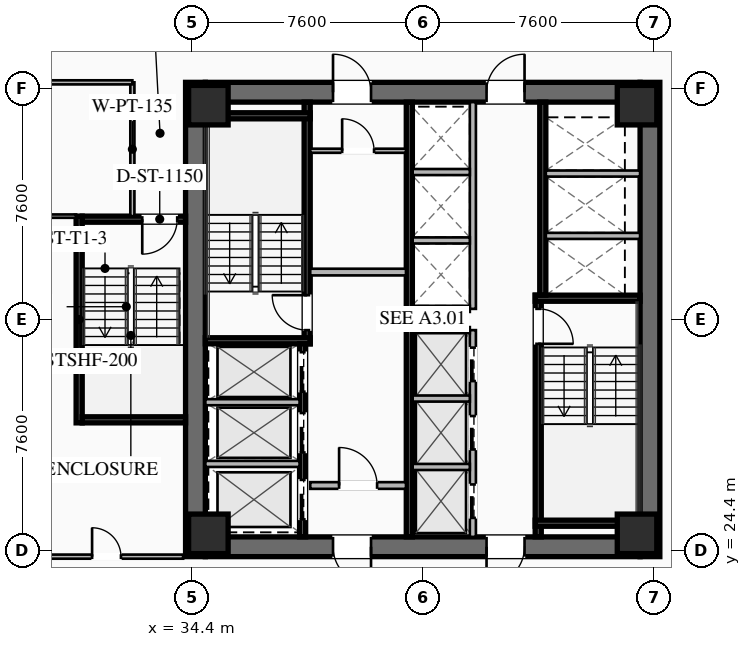
"""IFC4 building model, lengths in metres.
Left out: names, types, materials, properties, quantities, classifications, styles, units other than length and angle.
Written with IfcOpenShell. Run it as: python <this file> out.ifc"""

import sys

from ifc_helpers import new_model, si_unit, direction, frame, frame_2d, origin, origin_2d, place, context, subcontext, project, spatial, rectangle, hollow_rectangle, extrude, element, fill, save


model = new_model("IFC4")
c1 = context("Model", 3, precision=1e-05, world=origin(), true_north=direction((0.0, 1.0)))
c2 = subcontext(c1, "Body", "Model", "MODEL_VIEW")
j1 = project(units=[si_unit("LENGTHUNIT", "METRE"), si_unit("PLANEANGLEUNIT", "RADIAN")], contexts=[c1])
p1 = place(None, origin())
s1 = spatial("IfcSite", under=j1, at=p1, CompositionType="ELEMENT")
p2 = place(p1, origin())
s2 = spatial("IfcBuilding", under=s1, at=p2, CompositionType="ELEMENT")
p3 = place(p2, frame((0.0, 0.0, 49.45)))
s3 = spatial("IfcBuildingStorey", under=s2, at=p3, CompositionType="ELEMENT", Elevation=49.45)
for number, where, z_axis, x_axis in (
    (1, (34.525, 24.2, 0.0), (0.0, 0.0, 1.0), (0.0, 1.0, 0.0)),
    (2, (49.475, 39.8, 0.0), (0.0, 0.0, 1.0), (0.0, -1.0, 0.0)),
):
    element("IfcWall", number, at=place(p3, frame(where, z_axis=z_axis, x_axis=x_axis)), inside=s3, PredefinedType="SHEAR", context=c2, shape_type="SweptSolid", body=[
        extrude(rectangle(XDim=15.6, YDim=0.65, at=frame_2d((7.8, 0.0))), origin(), (0.0, 0.0, 1.0), 3.55),
    ])
p4 = place(p3, frame((49.15, 24.525, 0.0), z_axis=(0.0, 0.0, 1.0), x_axis=(-1.0, 0.0, 0.0)))
e3 = element("IfcWall", 3, at=p4, inside=s3, PredefinedType="SHEAR", context=c2, shape_type="SweptSolid", body=[
    extrude(rectangle(XDim=14.3, YDim=0.65, at=frame_2d((7.15, 0.0))), origin(), (0.0, 0.0, 1.0), 3.55),
])
p5 = place(p4, frame((8.85, 0.0, 0.0)))
e4 = element("IfcOpeningElement", 4, at=p5, cuts=e3, PredefinedType="OPENING", context=c2, shape_type="SweptSolid", body=[
    extrude(rectangle(XDim=1.25, YDim=2.25, at=frame_2d((0.625, 1.125))), frame((0.0, 0.335, 0.0), z_axis=(0.0, -1.0, 0.0), x_axis=(1.0, 0.0, 0.0)), (0.0, 0.0, 1.0), 0.67),
])
p6 = place(p4, frame((3.8, 0.0, 0.0)))
e5 = element("IfcOpeningElement", 5, at=p6, cuts=e3, PredefinedType="OPENING", context=c2, shape_type="SweptSolid", body=[
    extrude(rectangle(XDim=1.25, YDim=2.25, at=frame_2d((0.625, 1.125))), frame((0.0, 0.335, 0.0), z_axis=(0.0, -1.0, 0.0), x_axis=(1.0, 0.0, 0.0)), (0.0, 0.0, 1.0), 0.67),
])
p7 = place(p3, frame((34.85, 39.475, 0.0), z_axis=(0.0, 0.0, 1.0), x_axis=(1.0, 0.0, 0.0)))
e6 = element("IfcWall", 6, at=p7, inside=s3, PredefinedType="SHEAR", context=c2, shape_type="SweptSolid", body=[
    extrude(rectangle(XDim=14.3, YDim=0.65, at=frame_2d((7.15, 0.0))), origin(), (0.0, 0.0, 1.0), 3.55),
])
p8 = place(p7, frame((4.2, 0.0, 0.0)))
e7 = element("IfcOpeningElement", 7, at=p8, cuts=e6, PredefinedType="OPENING", context=c2, shape_type="SweptSolid", body=[
    extrude(rectangle(XDim=1.25, YDim=2.25, at=frame_2d((0.625, 1.125))), frame((0.0, 0.335, 0.0), z_axis=(0.0, -1.0, 0.0), x_axis=(1.0, 0.0, 0.0)), (0.0, 0.0, 1.0), 0.67),
])
p9 = place(p7, frame((9.25, 0.0, 0.0)))
e8 = element("IfcOpeningElement", 8, at=p9, cuts=e6, PredefinedType="OPENING", context=c2, shape_type="SweptSolid", body=[
    extrude(rectangle(XDim=1.25, YDim=2.25, at=frame_2d((0.625, 1.125))), frame((0.0, 0.335, 0.0), z_axis=(0.0, -1.0, 0.0), x_axis=(1.0, 0.0, 0.0)), (0.0, 0.0, 1.0), 0.67),
])
for number, where, z_axis, x_axis in (
    (9, (34.95, 24.95, 0.0), (0.0, 0.0, 1.0), (1.0, 0.0, 0.0)),
    (10, (49.05, 24.95, 0.0), (0.0, 0.0, 1.0), (1.0, 0.0, 0.0)),
    (11, (49.05, 39.05, 0.0), (0.0, 0.0, 1.0), (1.0, 0.0, 0.0)),
    (12, (34.95, 39.05, 0.0), (0.0, 0.0, 1.0), (1.0, 0.0, 0.0)),
):
    element("IfcColumn", number, at=place(p3, frame(where, z_axis=z_axis, x_axis=x_axis)), inside=s3, PredefinedType="COLUMN", context=c2, shape_type="SweptSolid", body=[
        extrude(hollow_rectangle(XDim=1.3, YDim=1.3, WallThickness=0.05, at=origin_2d()), origin(), (0.0, 0.0, 1.0), 3.35),
    ])
p10 = place(p3, frame((38.2, 31.2, 0.0), z_axis=(0.0, 0.0, 1.0), x_axis=(0.0, 1.0, 0.0)))
e13 = element("IfcWall", 13, at=p10, inside=s3, PredefinedType="SHEAR", context=c2, shape_type="SweptSolid", body=[
    extrude(rectangle(XDim=7.95, YDim=0.2, at=frame_2d((3.975, 0.0))), origin(), (0.0, 0.0, 1.0), 3.35),
])
p11 = place(p10, frame((0.45, 0.0, 0.0)))
e14 = element("IfcOpeningElement", 14, at=p11, cuts=e13, PredefinedType="OPENING", context=c2, shape_type="SweptSolid", body=[
    extrude(rectangle(XDim=1.15, YDim=2.2, at=frame_2d((0.575, 1.1))), frame((0.0, 0.11, 0.0), z_axis=(0.0, -1.0, 0.0), x_axis=(1.0, 0.0, 0.0)), (0.0, 0.0, 1.0), 0.22),
])
for number, where, z_axis, x_axis in (
    (15, (34.85, 31.3, 0.0), (0.0, 0.0, 1.0), (1.0, 0.0, 0.0)),
    (16, (34.85, 38.7, 0.0), (0.0, 0.0, 1.0), (1.0, 0.0, 0.0)),
):
    element("IfcWall", number, at=place(p3, frame(where, z_axis=z_axis, x_axis=x_axis)), inside=s3, PredefinedType="SHEAR", context=c2, shape_type="SweptSolid", body=[
        extrude(rectangle(XDim=3.45, YDim=0.2, at=frame_2d((1.725, 0.0))), origin(), (0.0, 0.0, 1.0), 3.35),
    ])
p12 = place(p3, frame((45.8, 32.8, 0.0), z_axis=(0.0, 0.0, 1.0), x_axis=(0.0, -1.0, 0.0)))
e17 = element("IfcWall", 17, at=p12, inside=s3, PredefinedType="SHEAR", context=c2, shape_type="SweptSolid", body=[
    extrude(rectangle(XDim=7.95, YDim=0.2, at=frame_2d((3.975, 0.0))), origin(), (0.0, 0.0, 1.0), 3.35),
])
p13 = place(p12, frame((0.45, 0.0, 0.0)))
e18 = element("IfcOpeningElement", 18, at=p13, cuts=e17, PredefinedType="OPENING", context=c2, shape_type="SweptSolid", body=[
    extrude(rectangle(XDim=1.15, YDim=2.2, at=frame_2d((0.575, 1.1))), frame((0.0, 0.11, 0.0), z_axis=(0.0, -1.0, 0.0), x_axis=(1.0, 0.0, 0.0)), (0.0, 0.0, 1.0), 0.22),
])
for number, where, z_axis, x_axis in (
    (19, (45.7, 32.7, 0.0), (0.0, 0.0, 1.0), (1.0, 0.0, 0.0)),
    (20, (45.7, 25.3, 0.0), (0.0, 0.0, 1.0), (1.0, 0.0, 0.0)),
):
    element("IfcWall", number, at=place(p3, frame(where, z_axis=z_axis, x_axis=x_axis)), inside=s3, PredefinedType="SHEAR", context=c2, shape_type="SweptSolid", body=[
        extrude(rectangle(XDim=3.45, YDim=0.2, at=frame_2d((1.725, 0.0))), origin(), (0.0, 0.0, 1.0), 3.35),
    ])
p14 = place(p3, frame((41.56, 24.85, 0.0), z_axis=(0.0, 0.0, 1.0), x_axis=(0.0, 1.0, 0.0)))
e21 = element("IfcWall", 21, at=p14, inside=s3, PredefinedType="SHEAR", context=c2, shape_type="SweptSolid", body=[
    extrude(rectangle(XDim=14.3, YDim=0.2, at=frame_2d((7.15, 0.0))), origin(), (0.0, 0.0, 1.0), 3.35),
])
p15 = place(p3, frame((38.3, 33.56, 0.0), z_axis=(0.0, 0.0, 1.0), x_axis=(1.0, 0.0, 0.0)))
e22 = element("IfcWall", 22, at=p15, inside=s3, PredefinedType="SOLIDWALL", context=c2, shape_type="SweptSolid", body=[
    extrude(rectangle(XDim=3.15, YDim=0.22, at=frame_2d((1.575, 0.0))), origin(), (0.0, 0.0, 1.0), 2.703),
])
p16 = place(p3, frame((38.3, 26.54, 0.0), z_axis=(0.0, 0.0, 1.0), x_axis=(1.0, 0.0, 0.0)))
e23 = element("IfcWall", 23, at=p16, inside=s3, PredefinedType="SOLIDWALL", context=c2, shape_type="SweptSolid", body=[
    extrude(rectangle(XDim=3.15, YDim=0.22, at=frame_2d((1.575, 0.0))), origin(), (0.0, 0.0, 1.0), 2.703),
])
p17 = place(p16, frame((0.95, 0.0, 0.0)))
e24 = element("IfcOpeningElement", 24, at=p17, cuts=e23, PredefinedType="OPENING", context=c2, shape_type="SweptSolid", body=[
    extrude(rectangle(XDim=1.25, YDim=2.25, at=frame_2d((0.625, 1.125))), frame((0.0, 0.12, 0.0), z_axis=(0.0, -1.0, 0.0), x_axis=(1.0, 0.0, 0.0)), (0.0, 0.0, 1.0), 0.24),
])
p18 = place(p3, frame((38.05, 24.85, 0.0), z_axis=(0.0, 0.0, 1.0), x_axis=(0.0, 1.0, 0.0)))
e25 = element("IfcWall", 25, at=p18, inside=s3, PredefinedType="SHEAR", context=c2, shape_type="SweptSolid", body=[
    extrude(rectangle(XDim=6.35, YDim=0.2, at=frame_2d((3.175, 0.0))), origin(), (0.0, 0.0, 1.0), 3.35),
])
p19 = place(p18, frame((4.775, 0.0, 0.0)))
e26 = element("IfcOpeningElement", 26, at=p19, cuts=e25, PredefinedType="OPENING", context=c2, shape_type="SweptSolid", body=[
    extrude(rectangle(XDim=1.3, YDim=2.25, at=frame_2d((0.65, 1.125))), frame((0.0, 0.11, 0.0), z_axis=(0.0, -1.0, 0.0), x_axis=(1.0, 0.0, 0.0)), (0.0, 0.0, 1.0), 0.22),
])
p20 = place(p18, frame((2.775, 0.0, 0.0)))
e27 = element("IfcOpeningElement", 27, at=p20, cuts=e25, PredefinedType="OPENING", context=c2, shape_type="SweptSolid", body=[
    extrude(rectangle(XDim=1.3, YDim=2.25, at=frame_2d((0.65, 1.125))), frame((0.0, 0.11, 0.0), z_axis=(0.0, -1.0, 0.0), x_axis=(1.0, 0.0, 0.0)), (0.0, 0.0, 1.0), 0.22),
])
p21 = place(p18, frame((0.575, 0.0, 0.0)))
e28 = element("IfcOpeningElement", 28, at=p21, cuts=e25, PredefinedType="OPENING", context=c2, shape_type="SweptSolid", body=[
    extrude(rectangle(XDim=1.3, YDim=2.25, at=frame_2d((0.65, 1.125))), frame((0.0, 0.11, 0.0), z_axis=(0.0, -1.0, 0.0), x_axis=(1.0, 0.0, 0.0)), (0.0, 0.0, 1.0), 0.22),
])
for number, where, z_axis, x_axis in (
    (29, (34.85, 27.25, 0.0), (0.0, 0.0, 1.0), (1.0, 0.0, 0.0)),
    (30, (34.85, 29.28, 0.0), (0.0, 0.0, 1.0), (1.0, 0.0, 0.0)),
):
    element("IfcWall", number, at=place(p3, frame(where, z_axis=z_axis, x_axis=x_axis)), inside=s3, PredefinedType="SOLIDWALL", context=c2, shape_type="SweptSolid", body=[
        extrude(rectangle(XDim=3.1, YDim=0.2, at=frame_2d((1.55, 0.0))), origin(), (0.0, 0.0, 1.0), 3.35),
    ])
p22 = place(p3, frame((45.95, 39.15, 0.0), z_axis=(0.0, 0.0, 1.0), x_axis=(0.0, -1.0, 0.0)))
e31 = element("IfcWall", 31, at=p22, inside=s3, PredefinedType="SHEAR", context=c2, shape_type="SweptSolid", body=[
    extrude(rectangle(XDim=6.35, YDim=0.2, at=frame_2d((3.175, 0.0))), origin(), (0.0, 0.0, 1.0), 3.35),
])
for number, where, z_axis, x_axis in (
    (32, (46.05, 34.75, 0.0), (0.0, 0.0, 1.0), (1.0, 0.0, 0.0)),
    (33, (46.05, 36.8, 0.0), (0.0, 0.0, 1.0), (1.0, 0.0, 0.0)),
):
    element("IfcWall", number, at=place(p3, frame(where, z_axis=z_axis, x_axis=x_axis)), inside=s3, PredefinedType="SOLIDWALL", context=c2, shape_type="SweptSolid", body=[
        extrude(rectangle(XDim=3.1, YDim=0.2, at=frame_2d((1.55, 0.0))), origin(), (0.0, 0.0, 1.0), 3.35),
    ])
p23 = place(p3, frame((38.3, 37.55, 0.0), z_axis=(0.0, 0.0, 1.0), x_axis=(1.0, 0.0, 0.0)))
e34 = element("IfcWall", 34, at=p23, inside=s3, PredefinedType="PARTITIONING", context=c2, shape_type="SweptSolid", body=[
    extrude(rectangle(XDim=3.15, YDim=0.135, at=frame_2d((1.575, 0.0))), origin(), (0.0, 0.0, 1.0), 2.703),
])
p24 = place(p23, frame((1.05, 0.0, 0.0)))
e35 = element("IfcOpeningElement", 35, at=p24, cuts=e34, PredefinedType="OPENING", context=c2, shape_type="SweptSolid", body=[
    extrude(rectangle(XDim=1.05, YDim=2.2, at=frame_2d((0.525, 1.1))), frame((0.0, 0.077, 0.0), z_axis=(0.0, -1.0, 0.0), x_axis=(1.0, 0.0, 0.0)), (0.0, 0.0, 1.0), 0.155),
])
p25 = place(p3, frame((43.65, 24.85, 0.0), z_axis=(0.0, 0.0, 1.0), x_axis=(0.0, 1.0, 0.0)))
e36 = element("IfcWall", 36, at=p25, inside=s3, PredefinedType="SOLIDWALL", context=c2, shape_type="SweptSolid", body=[
    extrude(rectangle(XDim=6.8, YDim=0.2, at=frame_2d((3.4, 0.0))), origin(), (0.0, 0.0, 1.0), 3.35),
])
p26 = place(p25, frame((0.625, 0.0, 0.0)))
e37 = element("IfcOpeningElement", 37, at=p26, cuts=e36, PredefinedType="OPENING", context=c2, shape_type="SweptSolid", body=[
    extrude(rectangle(XDim=1.1, YDim=2.2, at=frame_2d((0.55, 1.1))), frame((0.0, 0.11, 0.0), z_axis=(0.0, -1.0, 0.0), x_axis=(1.0, 0.0, 0.0)), (0.0, 0.0, 1.0), 0.22),
])
p27 = place(p25, frame((2.875, 0.0, 0.0)))
e38 = element("IfcOpeningElement", 38, at=p27, cuts=e36, PredefinedType="OPENING", context=c2, shape_type="SweptSolid", body=[
    extrude(rectangle(XDim=1.1, YDim=2.2, at=frame_2d((0.55, 1.1))), frame((0.0, 0.11, 0.0), z_axis=(0.0, -1.0, 0.0), x_axis=(1.0, 0.0, 0.0)), (0.0, 0.0, 1.0), 0.22),
])
p28 = place(p25, frame((5.125, 0.0, 0.0)))
e39 = element("IfcOpeningElement", 39, at=p28, cuts=e36, PredefinedType="OPENING", context=c2, shape_type="SweptSolid", body=[
    extrude(rectangle(XDim=1.1, YDim=2.2, at=frame_2d((0.55, 1.1))), frame((0.0, 0.11, 0.0), z_axis=(0.0, -1.0, 0.0), x_axis=(1.0, 0.0, 0.0)), (0.0, 0.0, 1.0), 0.22),
])
for number, where, z_axis, x_axis in (
    (40, (41.67, 27.15, 0.0), (0.0, 0.0, 1.0), (1.0, 0.0, 0.0)),
    (41, (41.67, 29.4, 0.0), (0.0, 0.0, 1.0), (1.0, 0.0, 0.0)),
    (42, (41.67, 31.65, 0.0), (0.0, 0.0, 1.0), (1.0, 0.0, 0.0)),
):
    element("IfcWall", number, at=place(p3, frame(where, z_axis=z_axis, x_axis=x_axis)), inside=s3, PredefinedType="SOLIDWALL", context=c2, shape_type="SweptSolid", body=[
        extrude(rectangle(XDim=1.88, YDim=0.2, at=frame_2d((0.94, 0.0))), origin(), (0.0, 0.0, 1.0), 3.35),
    ])
p29 = place(p3, frame((43.65, 32.35, 0.0), z_axis=(0.0, 0.0, 1.0), x_axis=(0.0, 1.0, 0.0)))
e43 = element("IfcWall", 43, at=p29, inside=s3, PredefinedType="SOLIDWALL", context=c2, shape_type="SweptSolid", body=[
    extrude(rectangle(XDim=6.8, YDim=0.2, at=frame_2d((3.4, 0.0))), origin(), (0.0, 0.0, 1.0), 3.35),
])
for number, where, z_axis, x_axis in (
    (44, (41.67, 32.35, 0.0), (0.0, 0.0, 1.0), (1.0, 0.0, 0.0)),
    (45, (41.67, 34.6, 0.0), (0.0, 0.0, 1.0), (1.0, 0.0, 0.0)),
    (46, (41.67, 36.85, 0.0), (0.0, 0.0, 1.0), (1.0, 0.0, 0.0)),
):
    element("IfcWall", number, at=place(p3, frame(where, z_axis=z_axis, x_axis=x_axis)), inside=s3, PredefinedType="SOLIDWALL", context=c2, shape_type="SweptSolid", body=[
        extrude(rectangle(XDim=1.88, YDim=0.2, at=frame_2d((0.94, 0.0))), origin(), (0.0, 0.0, 1.0), 3.35),
    ])
p30 = place(p3, frame((30.7, 28.6, 0.0), z_axis=(0.0, 0.0, 1.0), x_axis=(0.0, 1.0, 0.0)))
e47 = element("IfcWall", 47, at=p30, inside=s3, PredefinedType="SHEAR", context=c2, shape_type="SweptSolid", body=[
    extrude(rectangle(XDim=6.8, YDim=0.2, at=frame_2d((3.4, 0.0))), origin(), (0.0, 0.0, 1.0), 3.35),
])
p31 = place(p3, frame((34.2, 35.3, 0.0), z_axis=(0.0, 0.0, 1.0), x_axis=(-1.0, 0.0, 0.0)))
e48 = element("IfcWall", 48, at=p31, inside=s3, PredefinedType="SHEAR", context=c2, shape_type="SweptSolid", body=[
    extrude(rectangle(XDim=3.4, YDim=0.2, at=frame_2d((1.7, 0.0))), origin(), (0.0, 0.0, 1.0), 3.35),
])
p32 = place(p31, frame((0.275, 0.0, 0.0)))
e49 = element("IfcOpeningElement", 49, at=p32, cuts=e48, PredefinedType="OPENING", context=c2, shape_type="SweptSolid", body=[
    extrude(rectangle(XDim=1.15, YDim=2.2, at=frame_2d((0.575, 1.1))), frame((0.0, 0.11, 0.0), z_axis=(0.0, -1.0, 0.0), x_axis=(1.0, 0.0, 0.0)), (0.0, 0.0, 1.0), 0.22),
])
p33 = place(p3, frame((30.8, 28.7, 0.0), z_axis=(0.0, 0.0, 1.0), x_axis=(1.0, 0.0, 0.0)))
e50 = element("IfcWall", 50, at=p33, inside=s3, PredefinedType="SHEAR", context=c2, shape_type="SweptSolid", body=[
    extrude(rectangle(XDim=3.4, YDim=0.2, at=frame_2d((1.7, 0.0))), origin(), (0.0, 0.0, 1.0), 3.35),
])
p34 = place(p3, frame((32.45, 35.4, 0.0), z_axis=(0.0, 0.0, 1.0), x_axis=(0.0, 1.0, 0.0)))
e51 = element("IfcWall", 51, at=p34, inside=s3, PredefinedType="PARTITIONING", context=c2, shape_type="SweptSolid", body=[
    extrude(rectangle(XDim=4.4, YDim=0.135, at=frame_2d((2.2, 0.0))), origin(), (0.0, 0.0, 1.0), 2.703),
])
p35 = place(p3, frame((32.45, 39.8, 0.0), z_axis=(0.0, 0.0, 1.0), x_axis=(-1.0, 0.0, 0.0)))
e52 = element("IfcWall", 52, at=p35, inside=s3, PredefinedType="PARTITIONING", context=c2, shape_type="SweptSolid", body=[
    extrude(rectangle(XDim=13.33, YDim=0.135, at=frame_2d((6.665, 0.0))), origin(), (0.0, 0.0, 1.0), 2.703),
])
p36 = place(p35, frame((5.84, 0.0, 0.0)))
e53 = element("IfcOpeningElement", 53, at=p36, cuts=e52, PredefinedType="OPENING", context=c2, shape_type="SweptSolid", body=[
    extrude(rectangle(XDim=0.95, YDim=2.05, at=frame_2d((0.475, 1.025))), frame((0.0, 0.077, 0.0), z_axis=(0.0, -1.0, 0.0), x_axis=(1.0, 0.0, 0.0)), (0.0, 0.0, 1.0), 0.155),
])
p37 = place(p3, frame((19.12, 24.2, 0.0), z_axis=(0.0, 0.0, 1.0), x_axis=(1.0, 0.0, 0.0)))
e54 = element("IfcWall", 54, at=p37, inside=s3, PredefinedType="PARTITIONING", context=c2, shape_type="SweptSolid", body=[
    extrude(rectangle(XDim=15.0, YDim=0.135, at=frame_2d((7.5, 0.0))), origin(), (0.0, 0.0, 1.0), 2.703),
])
p38 = place(p37, frame((12.005, 0.0, 0.0)))
e55 = element("IfcOpeningElement", 55, at=p38, cuts=e54, PredefinedType="OPENING", context=c2, shape_type="SweptSolid", body=[
    extrude(rectangle(XDim=0.95, YDim=2.05, at=frame_2d((0.475, 1.025))), frame((0.0, 0.077, 0.0), z_axis=(0.0, -1.0, 0.0), x_axis=(1.0, 0.0, 0.0)), (0.0, 0.0, 1.0), 0.155),
])
p39 = place(p3, frame((30.6, 35.4, 0.0), z_axis=(0.0, 0.0, 1.0), x_axis=(-1.0, 0.0, 0.0)))
e56 = element("IfcWall", 56, at=p39, inside=s3, PredefinedType="PARTITIONING", context=c2, shape_type="SweptSolid", body=[
    extrude(rectangle(XDim=11.48, YDim=0.11, at=frame_2d((5.74, 0.0))), origin(), (0.0, 0.0, 1.0), 2.703),
])
p40 = place(p8, origin())
e57 = element("IfcDoor", 57, at=p40, inside=s3, OperationType="SINGLE_SWING_LEFT", PredefinedType="DOOR", context=c2, shape_type="SweptSolid", body=[
    extrude(rectangle(XDim=1.25, YDim=2.25, at=frame_2d((0.625, 1.125))), frame((0.0, 0.025, 0.0), z_axis=(0.0, -1.0, 0.0), x_axis=(1.0, 0.0, 0.0)), (0.0, 0.0, 1.0), 0.05),
])
fill(e7, e57)
p41 = place(p9, origin())
e58 = element("IfcDoor", 58, at=p41, inside=s3, OperationType="SINGLE_SWING_RIGHT", PredefinedType="DOOR", context=c2, shape_type="SweptSolid", body=[
    extrude(rectangle(XDim=1.25, YDim=2.25, at=frame_2d((0.625, 1.125))), frame((0.0, 0.025, 0.0), z_axis=(0.0, -1.0, 0.0), x_axis=(1.0, 0.0, 0.0)), (0.0, 0.0, 1.0), 0.05),
])
fill(e8, e58)
p42 = place(p5, origin())
e59 = element("IfcDoor", 59, at=p42, inside=s3, OperationType="SINGLE_SWING_LEFT", PredefinedType="DOOR", context=c2, shape_type="SweptSolid", body=[
    extrude(rectangle(XDim=1.25, YDim=2.25, at=frame_2d((0.625, 1.125))), frame((0.0, 0.025, 0.0), z_axis=(0.0, -1.0, 0.0), x_axis=(1.0, 0.0, 0.0)), (0.0, 0.0, 1.0), 0.05),
])
fill(e4, e59)
p43 = place(p6, origin())
e60 = element("IfcDoor", 60, at=p43, inside=s3, OperationType="SINGLE_SWING_RIGHT", PredefinedType="DOOR", context=c2, shape_type="SweptSolid", body=[
    extrude(rectangle(XDim=1.25, YDim=2.25, at=frame_2d((0.625, 1.125))), frame((0.0, 0.025, 0.0), z_axis=(0.0, -1.0, 0.0), x_axis=(1.0, 0.0, 0.0)), (0.0, 0.0, 1.0), 0.05),
])
fill(e5, e60)
p44 = place(p11, origin())
e61 = element("IfcDoor", 61, at=p44, inside=s3, OperationType="SINGLE_SWING_RIGHT", PredefinedType="DOOR", context=c2, shape_type="SweptSolid", body=[
    extrude(rectangle(XDim=1.15, YDim=2.2, at=frame_2d((0.575, 1.1))), frame((0.0, 0.025, 0.0), z_axis=(0.0, -1.0, 0.0), x_axis=(1.0, 0.0, 0.0)), (0.0, 0.0, 1.0), 0.05),
])
fill(e14, e61)
p45 = place(p13, origin())
e62 = element("IfcDoor", 62, at=p45, inside=s3, OperationType="SINGLE_SWING_RIGHT", PredefinedType="DOOR", context=c2, shape_type="SweptSolid", body=[
    extrude(rectangle(XDim=1.15, YDim=2.2, at=frame_2d((0.575, 1.1))), frame((0.0, 0.025, 0.0), z_axis=(0.0, -1.0, 0.0), x_axis=(1.0, 0.0, 0.0)), (0.0, 0.0, 1.0), 0.05),
])
fill(e18, e62)
p46 = place(p17, origin())
e63 = element("IfcDoor", 63, at=p46, inside=s3, OperationType="SINGLE_SWING_LEFT", PredefinedType="DOOR", context=c2, shape_type="SweptSolid", body=[
    extrude(rectangle(XDim=1.25, YDim=2.25, at=frame_2d((0.625, 1.125))), frame((0.0, 0.025, 0.0), z_axis=(0.0, -1.0, 0.0), x_axis=(1.0, 0.0, 0.0)), (0.0, 0.0, 1.0), 0.05),
])
fill(e24, e63)
p47 = place(p24, origin())
e64 = element("IfcDoor", 64, at=p47, inside=s3, OperationType="SINGLE_SWING_LEFT", PredefinedType="DOOR", context=c2, shape_type="SweptSolid", body=[
    extrude(rectangle(XDim=1.05, YDim=2.2, at=frame_2d((0.525, 1.1))), frame((0.0, 0.025, 0.0), z_axis=(0.0, -1.0, 0.0), x_axis=(1.0, 0.0, 0.0)), (0.0, 0.0, 1.0), 0.05),
])
fill(e35, e64)
p48 = place(p32, origin())
e65 = element("IfcDoor", 65, at=p48, inside=s3, OperationType="SINGLE_SWING_RIGHT", PredefinedType="DOOR", context=c2, shape_type="SweptSolid", body=[
    extrude(rectangle(XDim=1.15, YDim=2.2, at=frame_2d((0.575, 1.1))), frame((0.0, 0.025, 0.0), z_axis=(0.0, -1.0, 0.0), x_axis=(1.0, 0.0, 0.0)), (0.0, 0.0, 1.0), 0.05),
])
fill(e49, e65)
p49 = place(p38, origin())
e66 = element("IfcDoor", 66, at=p49, inside=s3, OperationType="SINGLE_SWING_LEFT", PredefinedType="DOOR", context=c2, shape_type="SweptSolid", body=[
    extrude(rectangle(XDim=0.95, YDim=2.05, at=frame_2d((0.475, 1.025))), frame((0.0, 0.025, 0.0), z_axis=(0.0, -1.0, 0.0), x_axis=(1.0, 0.0, 0.0)), (0.0, 0.0, 1.0), 0.05),
])
fill(e55, e66)
p50 = place(p19, origin())
e67 = element("IfcDoor", 67, at=p50, inside=s3, OperationType="SLIDING_TO_LEFT", PredefinedType="DOOR", context=c2, shape_type="SweptSolid", body=[
    extrude(rectangle(XDim=1.3, YDim=2.25, at=frame_2d((0.65, 1.125))), frame((0.0, 0.025, 0.0), z_axis=(0.0, -1.0, 0.0), x_axis=(1.0, 0.0, 0.0)), (0.0, 0.0, 1.0), 0.05),
])
fill(e26, e67)
p51 = place(p20, origin())
e68 = element("IfcDoor", 68, at=p51, inside=s3, OperationType="SLIDING_TO_LEFT", PredefinedType="DOOR", context=c2, shape_type="SweptSolid", body=[
    extrude(rectangle(XDim=1.3, YDim=2.25, at=frame_2d((0.65, 1.125))), frame((0.0, 0.025, 0.0), z_axis=(0.0, -1.0, 0.0), x_axis=(1.0, 0.0, 0.0)), (0.0, 0.0, 1.0), 0.05),
])
fill(e27, e68)
p52 = place(p21, origin())
e69 = element("IfcDoor", 69, at=p52, inside=s3, OperationType="SLIDING_TO_LEFT", PredefinedType="DOOR", context=c2, shape_type="SweptSolid", body=[
    extrude(rectangle(XDim=1.3, YDim=2.25, at=frame_2d((0.65, 1.125))), frame((0.0, 0.025, 0.0), z_axis=(0.0, -1.0, 0.0), x_axis=(1.0, 0.0, 0.0)), (0.0, 0.0, 1.0), 0.05),
])
fill(e28, e69)
p53 = place(p26, origin())
e70 = element("IfcDoor", 70, at=p53, inside=s3, OperationType="SLIDING_TO_LEFT", PredefinedType="DOOR", context=c2, shape_type="SweptSolid", body=[
    extrude(rectangle(XDim=1.1, YDim=2.2, at=frame_2d((0.55, 1.1))), frame((0.0, 0.025, 0.0), z_axis=(0.0, -1.0, 0.0), x_axis=(1.0, 0.0, 0.0)), (0.0, 0.0, 1.0), 0.05),
])
fill(e37, e70)
p54 = place(p27, origin())
e71 = element("IfcDoor", 71, at=p54, inside=s3, OperationType="SLIDING_TO_LEFT", PredefinedType="DOOR", context=c2, shape_type="SweptSolid", body=[
    extrude(rectangle(XDim=1.1, YDim=2.2, at=frame_2d((0.55, 1.1))), frame((0.0, 0.025, 0.0), z_axis=(0.0, -1.0, 0.0), x_axis=(1.0, 0.0, 0.0)), (0.0, 0.0, 1.0), 0.05),
])
fill(e38, e71)
p55 = place(p28, origin())
e72 = element("IfcDoor", 72, at=p55, inside=s3, OperationType="SLIDING_TO_LEFT", PredefinedType="DOOR", context=c2, shape_type="SweptSolid", body=[
    extrude(rectangle(XDim=1.1, YDim=2.2, at=frame_2d((0.55, 1.1))), frame((0.0, 0.025, 0.0), z_axis=(0.0, -1.0, 0.0), x_axis=(1.0, 0.0, 0.0)), (0.0, 0.0, 1.0), 0.05),
])
fill(e39, e72)
save(model, sys.argv[1])
